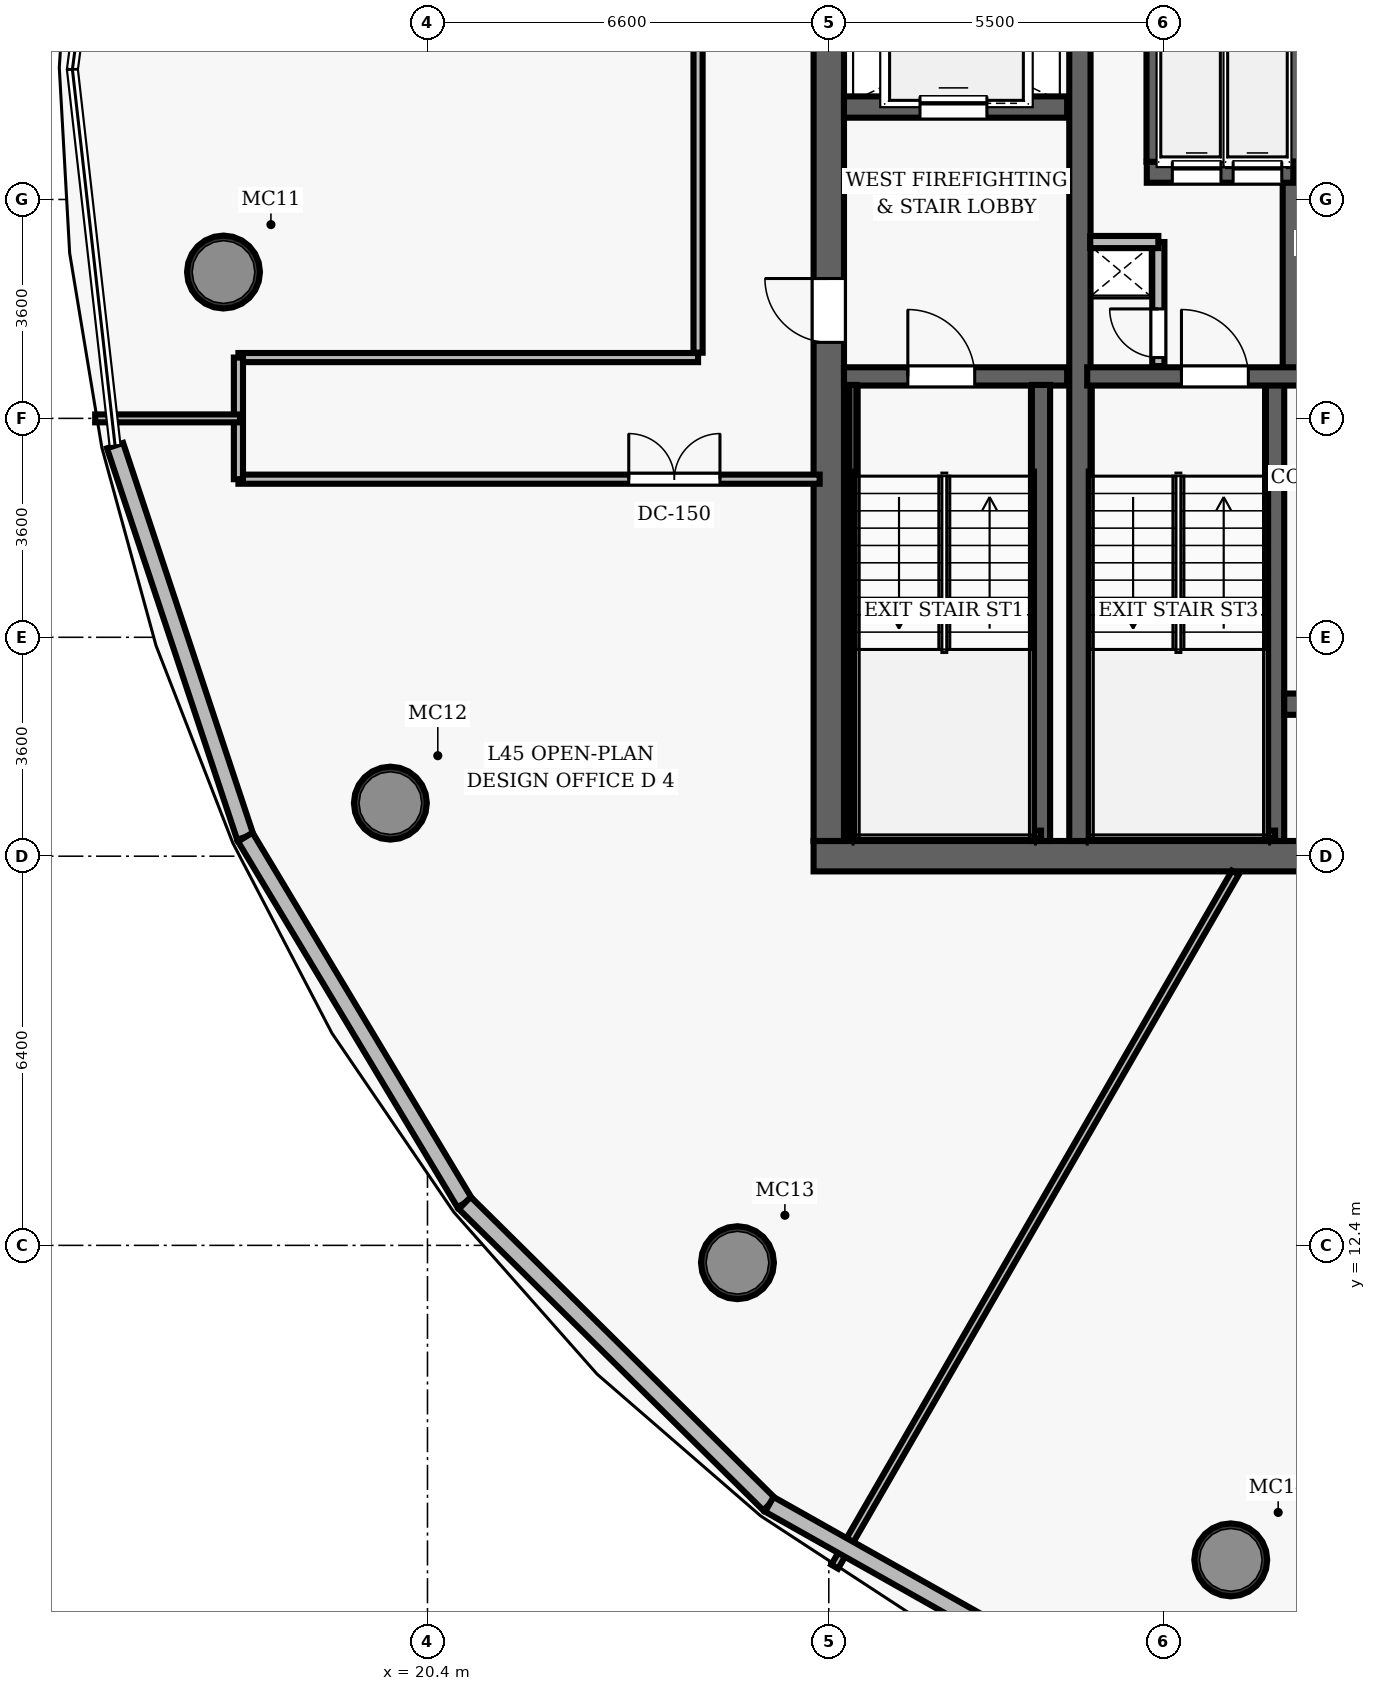
"""IFC4 building model, lengths in metres.
Left out: names, types, materials, properties, quantities, classifications, styles, units other than length and angle.
Written with IfcOpenShell. Run it as: python <this file> out.ifc"""

import sys

from ifc_helpers import new_model, si_unit, direction, frame, frame_2d, origin, origin_2d, place, context, subcontext, project, spatial, rectangle, hollow_circle, extrude, element, fill, save


model = new_model("IFC4")
c1 = context("Model", 3, precision=1e-05, world=origin(), true_north=direction((0.0, 1.0)))
c2 = subcontext(c1, "Body", "Model", "MODEL_VIEW")
j1 = project(units=[si_unit("LENGTHUNIT", "METRE"), si_unit("PLANEANGLEUNIT", "RADIAN")], contexts=[c1])
p1 = place(None, origin())
s1 = spatial("IfcSite", under=j1, at=p1, CompositionType="ELEMENT")
p2 = place(p1, origin())
s2 = spatial("IfcBuilding", under=s1, at=p2, CompositionType="ELEMENT")
p3 = place(p2, frame((0.0, 0.0, 178.9)))
s3 = spatial("IfcBuildingStorey", under=s2, at=p3, CompositionType="ELEMENT", Elevation=178.9)
p4 = place(p3, frame((26.75, 18.8, 0.0), z_axis=(0.0, 0.0, 1.0), x_axis=(1.0, 0.0, 0.0)))
e1 = element("IfcWall", 1, at=p4, inside=s3, PredefinedType="SHEAR", context=c2, shape_type="SweptSolid", body=[
    extrude(rectangle(XDim=22.5, YDim=0.5, at=frame_2d((11.25, 0.0))), origin(), (0.0, 0.0, 1.0), 3.85),
])
p5 = place(p4, frame((14.47, 0.0, 0.0)))
e2 = element("IfcOpeningElement", 2, at=p5, cuts=e1, PredefinedType="OPENING", context=c2, shape_type="SweptSolid", body=[
    extrude(rectangle(XDim=1.05, YDim=2.15, at=frame_2d((0.525, 1.075))), frame((0.0, 0.26, 0.0), z_axis=(0.0, -1.0, 0.0), x_axis=(1.0, 0.0, 0.0)), (0.0, 0.0, 1.0), 0.52),
])
p6 = place(p3, frame((27.0, 19.05, 0.0), z_axis=(0.0, 0.0, 1.0), x_axis=(0.0, 1.0, 0.0)))
e3 = element("IfcWall", 3, at=p6, inside=s3, PredefinedType="SHEAR", context=c2, shape_type="SweptSolid", body=[
    extrude(rectangle(XDim=13.9, YDim=0.5, at=frame_2d((6.95, 0.0))), origin(), (0.0, 0.0, 1.0), 3.85),
])
p7 = place(p6, frame((8.2, 0.0, 0.0)))
e4 = element("IfcOpeningElement", 4, at=p7, cuts=e3, PredefinedType="OPENING", context=c2, shape_type="SweptSolid", body=[
    extrude(rectangle(XDim=1.05, YDim=2.15, at=frame_2d((0.525, 1.075))), frame((0.0, 0.26, 0.0), z_axis=(0.0, -1.0, 0.0), x_axis=(1.0, 0.0, 0.0)), (0.0, 0.0, 1.0), 0.52),
])
p8 = place(p3, frame((31.13, 19.05, 0.0), z_axis=(0.0, 0.0, 1.0), x_axis=(0.0, 1.0, 0.0)))
e5 = element("IfcWall", 5, at=p8, inside=s3, PredefinedType="SHEAR", context=c2, shape_type="SweptSolid", body=[
    extrude(rectangle(XDim=13.9, YDim=0.35, at=frame_2d((6.95, 0.0))), origin(), (0.0, 0.0, 1.0), 3.85),
])
for number, where, z_axis, x_axis in (
    (6, (17.045, 28.406, 0.0), (0.0, 0.0, 1.0), (1.0, 0.0, 0.0)),
    (7, (19.79, 19.673, 0.0), (0.0, 0.0, 1.0), (1.0, 0.0, 0.0)),
    (8, (25.498, 12.115, 0.0), (0.0, 0.0, 1.0), (1.0, 0.0, 0.0)),
    (9, (33.611, 7.228, 0.0), (0.0, 0.0, 1.0), (1.0, 0.0, 0.0)),
):
    element("IfcColumn", number, at=place(p3, frame(where, z_axis=z_axis, x_axis=x_axis)), inside=s3, PredefinedType="COLUMN", context=c2, shape_type="SweptSolid", body=[
        extrude(hollow_circle(Radius=0.6, WallThickness=0.05, at=origin_2d()), origin(), (0.0, 0.0, 1.0), 3.85),
    ])
p9 = place(p3, frame((27.25, 26.69, 0.0), z_axis=(0.0, 0.0, 1.0), x_axis=(1.0, 0.0, 0.0)))
e10 = element("IfcWall", 10, at=p9, inside=s3, PredefinedType="SHEAR", context=c2, shape_type="SweptSolid", body=[
    extrude(rectangle(XDim=3.67, YDim=0.3, at=frame_2d((1.835, 0.0))), origin(), (0.0, 0.0, 1.0), 3.85),
])
p10 = place(p9, frame((1.05, 0.0, 0.0)))
e11 = element("IfcOpeningElement", 11, at=p10, cuts=e10, PredefinedType="OPENING", context=c2, shape_type="SweptSolid", body=[
    extrude(rectangle(XDim=1.1, YDim=2.15, at=frame_2d((0.55, 1.075))), frame((0.0, 0.16, 0.0), z_axis=(0.0, -1.0, 0.0), x_axis=(1.0, 0.0, 0.0)), (0.0, 0.0, 1.0), 0.32),
])
p11 = place(p3, frame((30.49, 19.05, 0.0), z_axis=(0.0, 0.0, 1.0), x_axis=(0.0, 1.0, 0.0)))
e12 = element("IfcWall", 12, at=p11, inside=s3, PredefinedType="SHEAR", context=c2, shape_type="SweptSolid", body=[
    extrude(rectangle(XDim=7.5, YDim=0.3, at=frame_2d((3.75, 0.0))), origin(), (0.0, 0.0, 1.0), 3.85),
])
p12 = place(p3, frame((27.395, 19.1, 0.0), z_axis=(0.0, 0.0, 1.0), x_axis=(0.0, 1.0, 0.0)))
e13 = element("IfcWall", 13, at=p12, inside=s3, PredefinedType="SHEAR", context=c2, shape_type="SweptSolid", body=[
    extrude(rectangle(XDim=7.45, YDim=0.12, at=frame_2d((3.725, 0.0))), origin(), (0.0, 0.0, 1.0), 3.85),
])
p13 = place(p3, frame((27.395, 19.16, 0.0), z_axis=(0.0, 0.0, 1.0), x_axis=(1.0, 0.0, 0.0)))
e14 = element("IfcWall", 14, at=p13, inside=s3, PredefinedType="SHEAR", context=c2, shape_type="SweptSolid", body=[
    extrude(rectangle(XDim=3.095, YDim=0.12, at=frame_2d((1.547, 0.0))), origin(), (0.0, 0.0, 1.0), 3.85),
])
p14 = place(p3, frame((27.25, 31.12, 0.0), z_axis=(0.0, 0.0, 1.0), x_axis=(1.0, 0.0, 0.0)))
e15 = element("IfcWall", 15, at=p14, inside=s3, PredefinedType="SHEAR", context=c2, shape_type="SweptSolid", body=[
    extrude(rectangle(XDim=3.67, YDim=0.35, at=frame_2d((1.835, 0.0))), origin(), (0.0, 0.0, 1.0), 3.035),
])
p15 = place(p14, frame((1.25, 0.0, 0.0)))
e16 = element("IfcOpeningElement", 16, at=p15, cuts=e15, PredefinedType="OPENING", context=c2, shape_type="SweptSolid", body=[
    extrude(rectangle(XDim=1.1, YDim=2.15, at=frame_2d((0.55, 1.075))), frame((0.0, 0.185, 0.0), z_axis=(0.0, -1.0, 0.0), x_axis=(1.0, 0.0, 0.0)), (0.0, 0.0, 1.0), 0.37),
])
p16 = place(p3, frame((34.34, 19.05, 0.0), z_axis=(0.0, 0.0, 1.0), x_axis=(0.0, 1.0, 0.0)))
e17 = element("IfcWall", 17, at=p16, inside=s3, PredefinedType="SHEAR", context=c2, shape_type="SweptSolid", body=[
    extrude(rectangle(XDim=7.5, YDim=0.3, at=frame_2d((3.75, 0.0))), origin(), (0.0, 0.0, 1.0), 3.85),
])
p17 = place(p3, frame((34.64, 26.69, 0.0), z_axis=(0.0, 0.0, 1.0), x_axis=(0.0, 1.0, 0.0)))
e18 = element("IfcWall", 18, at=p17, inside=s3, PredefinedType="SHEAR", context=c2, shape_type="SweptSolid", body=[
    extrude(rectangle(XDim=6.26, YDim=0.35, at=frame_2d((3.13, 0.0))), origin(), (0.0, 0.0, 1.0), 3.85),
])
p18 = place(p3, frame((31.25, 26.69, 0.0), z_axis=(0.0, 0.0, 1.0), x_axis=(1.0, 0.0, 0.0)))
e19 = element("IfcWall", 19, at=p18, inside=s3, PredefinedType="SHEAR", context=c2, shape_type="SweptSolid", body=[
    extrude(rectangle(XDim=3.56, YDim=0.3, at=frame_2d((1.78, 0.0))), origin(), (0.0, 0.0, 1.0), 3.85),
])
p19 = place(p18, frame((1.55, 0.0, 0.0)))
e20 = element("IfcOpeningElement", 20, at=p19, cuts=e19, PredefinedType="OPENING", context=c2, shape_type="SweptSolid", body=[
    extrude(rectangle(XDim=1.1, YDim=2.15, at=frame_2d((0.55, 1.075))), frame((0.0, 0.16, 0.0), z_axis=(0.0, -1.0, 0.0), x_axis=(1.0, 0.0, 0.0)), (0.0, 0.0, 1.0), 0.32),
])
p20 = place(p3, frame((31.3, 19.16, 0.0), z_axis=(0.0, 0.0, 1.0), x_axis=(1.0, 0.0, 0.0)))
e21 = element("IfcWall", 21, at=p20, inside=s3, PredefinedType="SHEAR", context=c2, shape_type="SweptSolid", body=[
    extrude(rectangle(XDim=3.04, YDim=0.12, at=frame_2d((1.52, 0.0))), origin(), (0.0, 0.0, 1.0), 3.85),
])
p21 = place(p3, frame((32.23, 30.05, 0.0), z_axis=(0.0, 0.0, 1.0), x_axis=(1.0, 0.0, 0.0)))
e22 = element("IfcWall", 22, at=p21, inside=s3, PredefinedType="SHEAR", context=c2, shape_type="SweptSolid", body=[
    extrude(rectangle(XDim=2.41, YDim=0.35, at=frame_2d((1.205, 0.0))), origin(), (0.0, 0.0, 1.0), 3.035),
])
p22 = place(p21, frame((0.42, 0.0, 0.0)))
e23 = element("IfcOpeningElement", 23, at=p22, cuts=e22, PredefinedType="OPENING", context=c2, shape_type="SweptSolid", body=[
    extrude(rectangle(XDim=0.8, YDim=2.15, at=frame_2d((0.4, 1.075))), frame((0.0, 0.185, 0.0), z_axis=(0.0, -1.0, 0.0), x_axis=(1.0, 0.0, 0.0)), (0.0, 0.0, 1.0), 0.37),
])
p23 = place(p21, frame((1.42, 0.0, 0.0)))
e24 = element("IfcOpeningElement", 24, at=p23, cuts=e22, PredefinedType="OPENING", context=c2, shape_type="SweptSolid", body=[
    extrude(rectangle(XDim=0.8, YDim=2.15, at=frame_2d((0.4, 1.075))), frame((0.0, 0.185, 0.0), z_axis=(0.0, -1.0, 0.0), x_axis=(1.0, 0.0, 0.0)), (0.0, 0.0, 1.0), 0.37),
])
p24 = place(p3, frame((32.4, 30.22, 0.0), z_axis=(0.0, 0.0, 1.0), x_axis=(0.0, 1.0, 0.0)))
e25 = element("IfcWall", 25, at=p24, inside=s3, PredefinedType="SHEAR", context=c2, shape_type="SweptSolid", body=[
    extrude(rectangle(XDim=2.73, YDim=0.35, at=frame_2d((1.365, 0.0))), origin(), (0.0, 0.0, 1.0), 3.035),
])
p25 = place(p3, frame((32.42, 26.86, 0.0), z_axis=(0.0, 0.0, 1.0), x_axis=(0.0, 1.0, 0.0)))
e26 = element("IfcWall", 26, at=p25, inside=s3, PredefinedType="PARTITIONING", context=c2, shape_type="SweptSolid", body=[
    extrude(rectangle(XDim=2.04, YDim=0.2, at=frame_2d((1.02, 0.0))), origin(), (0.0, 0.0, 1.0), 3.035),
])
p26 = place(p25, frame((0.14, 0.0, 0.0)))
e27 = element("IfcOpeningElement", 27, at=p26, cuts=e26, PredefinedType="OPENING", context=c2, shape_type="SweptSolid", body=[
    extrude(rectangle(XDim=0.8, YDim=2.05, at=frame_2d((0.4, 1.025))), frame((0.0, 0.11, 0.0), z_axis=(0.0, -1.0, 0.0), x_axis=(1.0, 0.0, 0.0)), (0.0, 0.0, 1.0), 0.22),
])
p27 = place(p3, frame((31.3, 28.9, 0.0), z_axis=(0.0, 0.0, 1.0), x_axis=(1.0, 0.0, 0.0)))
e28 = element("IfcWall", 28, at=p27, inside=s3, PredefinedType="PARTITIONING", context=c2, shape_type="SweptSolid", body=[
    extrude(rectangle(XDim=1.12, YDim=0.2, at=frame_2d((0.56, 0.0))), origin(), (0.0, 0.0, 1.0), 3.035),
])
p28 = place(p3, frame((34.49, 21.3, 0.0), z_axis=(0.0, 0.0, 1.0), x_axis=(1.0, 0.0, 0.0)))
e29 = element("IfcWall", 29, at=p28, inside=s3, PredefinedType="SHEAR", context=c2, shape_type="SweptSolid", body=[
    extrude(rectangle(XDim=6.68, YDim=0.35, at=frame_2d((3.34, 0.0))), origin(), (0.0, 0.0, 1.0), 3.035),
])
p29 = place(p28, frame((0.5, 0.0, 0.0)))
e30 = element("IfcOpeningElement", 30, at=p29, cuts=e29, PredefinedType="OPENING", context=c2, shape_type="SweptSolid", body=[
    extrude(rectangle(XDim=0.9, YDim=2.15, at=frame_2d((0.45, 1.075))), frame((0.0, 0.185, 0.0), z_axis=(0.0, -1.0, 0.0), x_axis=(1.0, 0.0, 0.0)), (0.0, 0.0, 1.0), 0.37),
])
p30 = place(p28, frame((2.58, 0.0, 0.0)))
e31 = element("IfcOpeningElement", 31, at=p30, cuts=e29, PredefinedType="OPENING", context=c2, shape_type="SweptSolid", body=[
    extrude(rectangle(XDim=0.9, YDim=2.15, at=frame_2d((0.45, 1.075))), frame((0.0, 0.185, 0.0), z_axis=(0.0, -1.0, 0.0), x_axis=(1.0, 0.0, 0.0)), (0.0, 0.0, 1.0), 0.37),
])
p31 = place(p28, frame((4.66, 0.0, 0.0)))
e32 = element("IfcOpeningElement", 32, at=p31, cuts=e29, PredefinedType="OPENING", context=c2, shape_type="SweptSolid", body=[
    extrude(rectangle(XDim=0.9, YDim=2.15, at=frame_2d((0.45, 1.075))), frame((0.0, 0.185, 0.0), z_axis=(0.0, -1.0, 0.0), x_axis=(1.0, 0.0, 0.0)), (0.0, 0.0, 1.0), 0.37),
])
p32 = place(p3, frame((24.85, 27.08, 0.0), z_axis=(0.0, 0.0, 1.0), x_axis=(0.0, 1.0, 0.0)))
e33 = element("IfcWall", 33, at=p32, inside=s3, PredefinedType="PARTITIONING", context=c2, shape_type="SweptSolid", body=[
    extrude(rectangle(XDim=8.12, YDim=0.15, at=frame_2d((4.06, 0.0))), origin(), (0.0, 0.0, 1.0), 3.035),
])
p33 = place(p3, frame((17.291, 27.0, 0.0), z_axis=(0.0, 0.0, 1.0), x_axis=(1.0, 0.0, 0.0)))
e34 = element("IfcWall", 34, at=p33, inside=s3, PredefinedType="PARTITIONING", context=c2, shape_type="SweptSolid", body=[
    extrude(rectangle(XDim=7.559, YDim=0.15, at=frame_2d((3.78, 0.0))), origin(), (0.0, 0.0, 1.0), 3.035),
])
p34 = place(p3, frame((17.291, 25.0, 0.0), z_axis=(0.0, 0.0, 1.0), x_axis=(1.0, 0.0, 0.0)))
e35 = element("IfcWall", 35, at=p34, inside=s3, PredefinedType="PARTITIONING", context=c2, shape_type="SweptSolid", body=[
    extrude(rectangle(XDim=9.559, YDim=0.15, at=frame_2d((4.78, 0.0))), origin(), (0.0, 0.0, 1.0), 3.035),
])
p35 = place(p34, frame((6.419, 0.0, 0.0)))
e36 = element("IfcOpeningElement", 36, at=p35, cuts=e35, PredefinedType="OPENING", context=c2, shape_type="SweptSolid", body=[
    extrude(rectangle(XDim=1.5, YDim=2.2, at=frame_2d((0.75, 1.1))), frame((0.0, 0.085, 0.0), z_axis=(0.0, -1.0, 0.0), x_axis=(1.0, 0.0, 0.0)), (0.0, 0.0, 1.0), 0.17),
])
p36 = place(p3, frame((17.291, 25.0, 0.0), z_axis=(0.0, 0.0, 1.0), x_axis=(0.0, 1.0, 0.0)))
e37 = element("IfcWall", 37, at=p36, inside=s3, PredefinedType="PARTITIONING", context=c2, shape_type="SweptSolid", body=[
    extrude(rectangle(XDim=2.0, YDim=0.15, at=frame_2d((1.0, 0.0))), origin(), (0.0, 0.0, 1.0), 3.035),
])
p37 = place(p3, frame((17.317, 26.0, 0.0), z_axis=(0.0, 0.0, 1.0), x_axis=(-1.0, 0.0, 0.0)))
e38 = element("IfcWall", 38, at=p37, inside=s3, PredefinedType="PARTITIONING", context=c2, shape_type="SweptSolid", body=[
    extrude(rectangle(XDim=2.382, YDim=0.13, at=frame_2d((1.191, 0.0))), origin(), (0.0, 0.0, 1.0), 3.035),
])
p38 = place(p3, frame((33.687, 18.53, 0.0), z_axis=(0.0, 0.0, 1.0), x_axis=(-0.499996112969, -0.866027647951, 0.0)))
e39 = element("IfcWall", 39, at=p38, inside=s3, PredefinedType="PARTITIONING", context=c2, shape_type="SweptSolid", body=[
    extrude(rectangle(XDim=13.18, YDim=0.13, at=frame_2d((6.59, 0.0))), origin(), (0.0, 0.0, 1.0), 3.035),
])
p39 = place(p3, frame((17.403, 19.115, 0.0), z_axis=(0.0, 0.0, 1.0), x_axis=(-0.315590755591, 0.948895397283, 0.0)))
e40 = element("IfcWall", 40, at=p39, inside=s3, PredefinedType="SOLIDWALL", context=c2, shape_type="SweptSolid", body=[
    extrude(rectangle(XDim=6.784, YDim=0.28, at=frame_2d((3.392, 0.0))), origin(), (0.0, 0.0, 1.0), 3.62),
])
p40 = place(p3, frame((21.013, 13.097, 0.0), z_axis=(0.0, 0.0, 1.0), x_axis=(-0.514434360632, 0.857529759601, 0.0)))
e41 = element("IfcWall", 41, at=p40, inside=s3, PredefinedType="SOLIDWALL", context=c2, shape_type="SweptSolid", body=[
    extrude(rectangle(XDim=7.018, YDim=0.28, at=frame_2d((3.509, 0.0))), origin(), (0.0, 0.0, 1.0), 3.62),
])
p41 = place(p3, frame((26.021, 8.141, 0.0), z_axis=(0.0, 0.0, 1.0), x_axis=(-0.710839231307, 0.703354524572, 0.0)))
e42 = element("IfcWall", 42, at=p41, inside=s3, PredefinedType="SOLIDWALL", context=c2, shape_type="SweptSolid", body=[
    extrude(rectangle(XDim=7.046, YDim=0.28, at=frame_2d((3.523, 0.0))), origin(), (0.0, 0.0, 1.0), 3.62),
])
p42 = place(p3, frame((32.159, 4.682, 0.0), z_axis=(0.0, 0.0, 1.0), x_axis=(-0.871187511023, 0.490950425845, 0.0)))
e43 = element("IfcWall", 43, at=p42, inside=s3, PredefinedType="SOLIDWALL", context=c2, shape_type="SweptSolid", body=[
    extrude(rectangle(XDim=7.045, YDim=0.28, at=frame_2d((3.523, 0.0))), origin(), (0.0, 0.0, 1.0), 3.62),
])
p43 = place(p10, origin())
e44 = element("IfcDoor", 44, at=p43, inside=s3, OperationType="SINGLE_SWING_LEFT", PredefinedType="DOOR", context=c2, shape_type="SweptSolid", body=[
    extrude(rectangle(XDim=1.1, YDim=2.15, at=frame_2d((0.55, 1.075))), frame((0.0, 0.025, 0.0), z_axis=(0.0, -1.0, 0.0), x_axis=(1.0, 0.0, 0.0)), (0.0, 0.0, 1.0), 0.05),
])
fill(e11, e44)
p44 = place(p7, origin())
e45 = element("IfcDoor", 45, at=p44, inside=s3, OperationType="SINGLE_SWING_RIGHT", PredefinedType="DOOR", context=c2, shape_type="SweptSolid", body=[
    extrude(rectangle(XDim=1.05, YDim=2.15, at=frame_2d((0.525, 1.075))), frame((0.0, 0.025, 0.0), z_axis=(0.0, -1.0, 0.0), x_axis=(1.0, 0.0, 0.0)), (0.0, 0.0, 1.0), 0.05),
])
fill(e4, e45)
p45 = place(p19, origin())
e46 = element("IfcDoor", 46, at=p45, inside=s3, OperationType="SINGLE_SWING_LEFT", PredefinedType="DOOR", context=c2, shape_type="SweptSolid", body=[
    extrude(rectangle(XDim=1.1, YDim=2.15, at=frame_2d((0.55, 1.075))), frame((0.0, 0.025, 0.0), z_axis=(0.0, -1.0, 0.0), x_axis=(1.0, 0.0, 0.0)), (0.0, 0.0, 1.0), 0.05),
])
fill(e20, e46)
p46 = place(p26, origin())
e47 = element("IfcDoor", 47, at=p46, inside=s3, OperationType="SINGLE_SWING_RIGHT", PredefinedType="DOOR", context=c2, shape_type="SweptSolid", body=[
    extrude(rectangle(XDim=0.8, YDim=2.05, at=frame_2d((0.4, 1.025))), frame((0.0, 0.025, 0.0), z_axis=(0.0, -1.0, 0.0), x_axis=(1.0, 0.0, 0.0)), (0.0, 0.0, 1.0), 0.05),
])
fill(e27, e47)
p47 = place(p35, origin())
e48 = element("IfcDoor", 48, at=p47, inside=s3, OperationType="DOUBLE_DOOR_SINGLE_SWING", PredefinedType="DOOR", context=c2, shape_type="SweptSolid", body=[
    extrude(rectangle(XDim=1.5, YDim=2.2, at=frame_2d((0.75, 1.1))), frame((0.0, 0.025, 0.0), z_axis=(0.0, -1.0, 0.0), x_axis=(1.0, 0.0, 0.0)), (0.0, 0.0, 1.0), 0.05),
])
fill(e36, e48)
p48 = place(p15, origin())
e49 = element("IfcDoor", 49, at=p48, inside=s3, OperationType="SLIDING_TO_LEFT", PredefinedType="DOOR", context=c2, shape_type="SweptSolid", body=[
    extrude(rectangle(XDim=1.1, YDim=2.15, at=frame_2d((0.55, 1.075))), frame((0.0, 0.025, 0.0), z_axis=(0.0, -1.0, 0.0), x_axis=(1.0, 0.0, 0.0)), (0.0, 0.0, 1.0), 0.05),
])
fill(e16, e49)
p49 = place(p22, origin())
e50 = element("IfcDoor", 50, at=p49, inside=s3, OperationType="SLIDING_TO_LEFT", PredefinedType="DOOR", context=c2, shape_type="SweptSolid", body=[
    extrude(rectangle(XDim=0.8, YDim=2.15, at=frame_2d((0.4, 1.075))), frame((0.0, 0.025, 0.0), z_axis=(0.0, -1.0, 0.0), x_axis=(1.0, 0.0, 0.0)), (0.0, 0.0, 1.0), 0.05),
])
fill(e23, e50)
p50 = place(p23, origin())
e51 = element("IfcDoor", 51, at=p50, inside=s3, OperationType="SLIDING_TO_LEFT", PredefinedType="DOOR", context=c2, shape_type="SweptSolid", body=[
    extrude(rectangle(XDim=0.8, YDim=2.15, at=frame_2d((0.4, 1.075))), frame((0.0, 0.025, 0.0), z_axis=(0.0, -1.0, 0.0), x_axis=(1.0, 0.0, 0.0)), (0.0, 0.0, 1.0), 0.05),
])
fill(e24, e51)
save(model, sys.argv[1])
